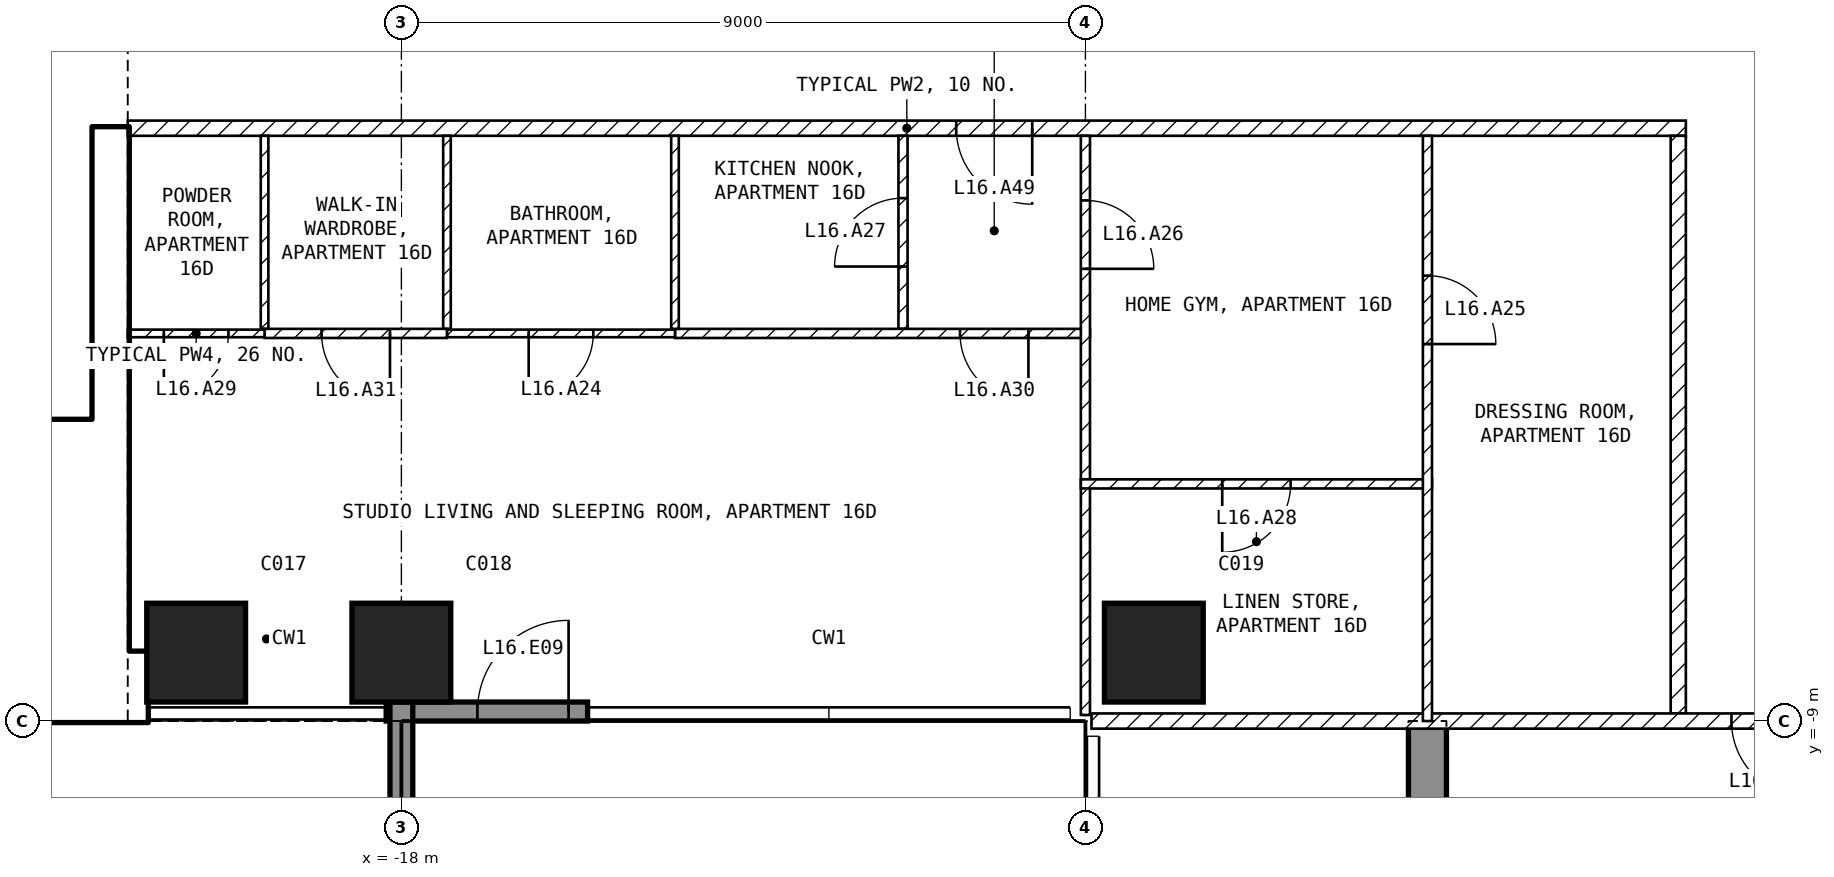
"""IFC4 building model, lengths in metres.
Left out: names, types, materials, properties, quantities, classifications, styles, units other than length and angle.
Written with IfcOpenShell. Run it as: python <this file> out.ifc"""

import sys

from ifc_helpers import new_model, si_unit, direction, frame, frame_2d, origin, origin_2d, place, context, subcontext, project, spatial, polyline, rectangle, outline, extrude, element, fill, save


model = new_model("IFC4")
c1 = context("Model", 3, precision=1e-05, world=origin(), true_north=direction((0.0, 1.0)))
c2 = subcontext(c1, "Body", "Model", "MODEL_VIEW")
j1 = project(units=[si_unit("LENGTHUNIT", "METRE"), si_unit("PLANEANGLEUNIT", "RADIAN")], contexts=[c1])
p1 = place(None, origin())
s1 = spatial("IfcSite", under=j1, at=p1, CompositionType="ELEMENT")
p2 = place(p1, origin())
s2 = spatial("IfcBuilding", under=s1, at=p2, CompositionType="ELEMENT")
p3 = place(p2, frame((0.0, 0.0, 75.0)))
s3 = spatial("IfcBuildingStorey", under=s2, at=p3, CompositionType="ELEMENT", Elevation=75.0)
for number, where, z_axis, x_axis in (
    (1, (-20.7, -8.1, -0.25), (0.0, 0.0, 1.0), (1.0, 0.0, 0.0)),
    (2, (-18.0, -8.1, -0.25), (0.0, 0.0, 1.0), (1.0, 0.0, 0.0)),
    (3, (-8.1, -8.1, -0.25), (0.0, 0.0, 1.0), (1.0, 0.0, 0.0)),
):
    element("IfcColumn", number, at=place(p3, frame(where, z_axis=z_axis, x_axis=x_axis)), inside=s3, PredefinedType="COLUMN", context=c2, shape_type="SweptSolid", body=[
        extrude(rectangle(XDim=1.3, YDim=1.3, at=origin_2d()), origin(), (0.0, 0.0, 1.0), 3.5),
    ])
p4 = place(p3, frame((-4.75, -25.45, -0.25), z_axis=(1.0, 0.0, 0.0), x_axis=(0.0, 1.0, 0.0)))
e4 = element("IfcWall", 4, at=p4, inside=s3, PredefinedType="SHEAR", context=c2, shape_type="SweptSolid", body=[
    extrude(outline(polyline([(0.0, 0.0), (4.15, 0.0), (4.15, 2.65), (6.55, 2.65), (6.55, 0.0), (11.95, 0.0), (11.95, 2.65), (14.35, 2.65), (14.35, 0.0), (16.45, 0.0), (16.45, 3.5), (0.0, 3.5), (0.0, 0.0)])), origin(), (0.0, 0.0, 1.0), 0.5),
])
p5 = place(p3, frame((-18.2, -8.875, 0.0), z_axis=(0.0, 0.0, 1.0), x_axis=(1.0, 0.0, 0.0)))
e5 = element("IfcWall", 5, at=p5, inside=s3, PredefinedType="SOLIDWALL", context=c2, shape_type="SweptSolid", body=[
    extrude(rectangle(XDim=2.65, YDim=0.25, at=frame_2d((1.325, 0.0))), origin(), (0.0, 0.0, 1.0), 3.25),
])
p6 = place(p5, frame((1.2, 0.0, 0.0)))
e6 = element("IfcOpeningElement", 6, at=p6, cuts=e5, PredefinedType="OPENING", context=c2, shape_type="SweptSolid", body=[
    extrude(rectangle(XDim=1.2, YDim=2.4, at=frame_2d((0.6, 1.2))), frame((0.0, 0.135, 0.0), z_axis=(0.0, -1.0, 0.0), x_axis=(1.0, 0.0, 0.0)), (0.0, 0.0, 1.0), 0.27),
])
p7 = place(p3, frame((-18.0, -8.75, 0.0), z_axis=(0.0, 0.0, 1.0), x_axis=(0.0, -1.0, 0.0)))
e7 = element("IfcWall", 7, at=p7, inside=s3, PredefinedType="SOLIDWALL", context=c2, shape_type="SweptSolid", body=[
    extrude(rectangle(XDim=2.95, YDim=0.3, at=frame_2d((1.475, 0.0))), origin(), (0.0, 0.0, 1.0), 3.25),
])
p8 = place(p3, frame((-32.4, -8.55, 0.0), z_axis=(0.0, 0.0, 1.0), x_axis=(1.0, 0.0, 0.0)))
e8 = element("IfcWall", 8, at=p8, inside=s3, PredefinedType="SHEAR", context=c2, shape_type="SweptSolid", body=[
    extrude(rectangle(XDim=11.05, YDim=0.9, at=frame_2d((5.525, 0.0))), origin(), (0.0, 0.0, 1.0), 3.25),
])
p9 = place(p3, frame((-21.825, -8.1, 0.0), z_axis=(0.0, 0.0, 1.0), x_axis=(0.0, 1.0, 0.0)))
e9 = element("IfcWall", 9, at=p9, inside=s3, PredefinedType="SHEAR", context=c2, shape_type="SweptSolid", body=[
    extrude(rectangle(XDim=6.9, YDim=0.45, at=frame_2d((3.45, 0.0))), origin(), (0.0, 0.0, 1.0), 3.25),
])
p10 = place(p3, frame((-28.35, -5.15, 0.0), z_axis=(0.0, 0.0, 1.0), x_axis=(1.0, 0.0, 0.0)))
e10 = element("IfcWall", 10, at=p10, inside=s3, PredefinedType="SOLIDWALL", context=c2, shape_type="SweptSolid", body=[
    extrude(rectangle(XDim=6.3, YDim=0.2, at=frame_2d((3.15, 0.0))), origin(), (0.0, 0.0, 1.0), 3.25),
])
p11 = place(p10, frame((5.1, 0.0, 0.0)))
e11 = element("IfcOpeningElement", 11, at=p11, cuts=e10, PredefinedType="OPENING", context=c2, shape_type="SweptSolid", body=[
    extrude(rectangle(XDim=1.0, YDim=2.1, at=frame_2d((0.5, 1.05))), frame((0.0, 0.11, 0.0), z_axis=(0.0, -1.0, 0.0), x_axis=(1.0, 0.0, 0.0)), (0.0, 0.0, 1.0), 0.22),
])
p12 = place(p3, frame((-1.1, -1.2, 0.0), z_axis=(0.0, 0.0, 1.0), x_axis=(-1.0, 0.0, 0.0)))
e12 = element("IfcWall", 12, at=p12, inside=s3, PredefinedType="PARTITIONING", context=c2, shape_type="SweptSolid", body=[
    extrude(rectangle(XDim=20.5, YDim=0.2, at=frame_2d((10.25, 0.0))), origin(), (0.0, 0.0, 1.0), 3.25),
])
p13 = place(p12, frame((8.6, 0.0, 0.0)))
e13 = element("IfcOpeningElement", 13, at=p13, cuts=e12, PredefinedType="OPENING", context=c2, shape_type="SweptSolid", body=[
    extrude(rectangle(XDim=1.0, YDim=2.1, at=frame_2d((0.5, 1.05))), frame((0.0, 0.11, 0.0), z_axis=(0.0, -1.0, 0.0), x_axis=(1.0, 0.0, 0.0)), (0.0, 0.0, 1.0), 0.22),
])
p14 = place(p3, frame((-1.2, -8.9, 0.0), z_axis=(0.0, 0.0, 1.0), x_axis=(0.0, 1.0, 0.0)))
e14 = element("IfcWall", 14, at=p14, inside=s3, PredefinedType="PARTITIONING", context=c2, shape_type="SweptSolid", body=[
    extrude(rectangle(XDim=7.6, YDim=0.2, at=frame_2d((3.8, 0.0))), origin(), (0.0, 0.0, 1.0), 3.25),
])
p15 = place(p3, frame((8.92, -9.0, 0.0), z_axis=(0.0, 0.0, 1.0), x_axis=(-1.0, 0.0, 0.0)))
e15 = element("IfcWall", 15, at=p15, inside=s3, PredefinedType="PARTITIONING", context=c2, shape_type="SweptSolid", body=[
    extrude(rectangle(XDim=17.84, YDim=0.2, at=frame_2d((8.92, 0.0))), origin(), (0.0, 0.0, 1.0), 3.25),
])
p16 = place(p15, frame((8.42, 0.0, 0.0)))
e16 = element("IfcOpeningElement", 16, at=p16, cuts=e15, PredefinedType="OPENING", context=c2, shape_type="SweptSolid", body=[
    extrude(rectangle(XDim=1.0, YDim=2.1, at=frame_2d((0.5, 1.05))), frame((0.0, 0.11, 0.0), z_axis=(0.0, -1.0, 0.0), x_axis=(1.0, 0.0, 0.0)), (0.0, 0.0, 1.0), 0.22),
])
p17 = place(p3, frame((-11.4, -3.84, 0.0), z_axis=(0.0, 0.0, 1.0), x_axis=(0.0, 1.0, 0.0)))
e17 = element("IfcWall", 17, at=p17, inside=s3, PredefinedType="PARTITIONING", context=c2, shape_type="SweptSolid", body=[
    extrude(rectangle(XDim=2.54, YDim=0.12, at=frame_2d((1.27, 0.0))), origin(), (0.0, 0.0, 1.0), 3.25),
])
p18 = place(p17, frame((0.82, 0.0, 0.0)))
e18 = element("IfcOpeningElement", 18, at=p18, cuts=e17, PredefinedType="OPENING", context=c2, shape_type="SweptSolid", body=[
    extrude(rectangle(XDim=0.9, YDim=2.1, at=frame_2d((0.45, 1.05))), frame((0.0, 0.07, 0.0), z_axis=(0.0, -1.0, 0.0), x_axis=(1.0, 0.0, 0.0)), (0.0, 0.0, 1.0), 0.14),
])
p19 = place(p3, frame((-8.94, -3.9, 0.0), z_axis=(0.0, 0.0, 1.0), x_axis=(-1.0, 0.0, 0.0)))
e19 = element("IfcWall", 19, at=p19, inside=s3, PredefinedType="PARTITIONING", context=c2, shape_type="SweptSolid", body=[
    extrude(rectangle(XDim=5.46, YDim=0.12, at=frame_2d((2.73, 0.0))), origin(), (0.0, 0.0, 1.0), 3.25),
])
p20 = place(p19, frame((0.81, 0.0, 0.0)))
e20 = element("IfcOpeningElement", 20, at=p20, cuts=e19, PredefinedType="OPENING", context=c2, shape_type="SweptSolid", body=[
    extrude(rectangle(XDim=0.9, YDim=2.1, at=frame_2d((0.45, 1.05))), frame((0.0, 0.07, 0.0), z_axis=(0.0, -1.0, 0.0), x_axis=(1.0, 0.0, 0.0)), (0.0, 0.0, 1.0), 0.14),
])
p21 = place(p3, frame((-9.0, -1.3, 0.0), z_axis=(0.0, 0.0, 1.0), x_axis=(0.0, -1.0, 0.0)))
e21 = element("IfcWall", 21, at=p21, inside=s3, PredefinedType="PARTITIONING", context=c2, shape_type="SweptSolid", body=[
    extrude(rectangle(XDim=7.62, YDim=0.12, at=frame_2d((3.81, 0.0))), origin(), (0.0, 0.0, 1.0), 3.25),
])
p22 = place(p21, frame((0.85, 0.0, 0.0)))
e22 = element("IfcOpeningElement", 22, at=p22, cuts=e21, PredefinedType="OPENING", context=c2, shape_type="SweptSolid", body=[
    extrude(rectangle(XDim=0.9, YDim=2.1, at=frame_2d((0.45, 1.05))), frame((0.0, 0.07, 0.0), z_axis=(0.0, -1.0, 0.0), x_axis=(1.0, 0.0, 0.0)), (0.0, 0.0, 1.0), 0.14),
])
for number, where, z_axis, x_axis in (
    (23, (-14.4, -3.84, 0.0), (0.0, 0.0, 1.0), (0.0, 1.0, 0.0)),
    (24, (-17.4, -3.84, 0.0), (0.0, 0.0, 1.0), (0.0, 1.0, 0.0)),
):
    element("IfcWall", number, at=place(p3, frame(where, z_axis=z_axis, x_axis=x_axis)), inside=s3, PredefinedType="PARTITIONING", context=c2, shape_type="SweptSolid", body=[
        extrude(rectangle(XDim=2.54, YDim=0.1, at=frame_2d((1.27, 0.0))), origin(), (0.0, 0.0, 1.0), 3.25),
    ])
p23 = place(p3, frame((-14.4, -3.9, 0.0), z_axis=(0.0, 0.0, 1.0), x_axis=(-1.0, 0.0, 0.0)))
e25 = element("IfcWall", 25, at=p23, inside=s3, PredefinedType="PARTITIONING", context=c2, shape_type="SweptSolid", body=[
    extrude(rectangle(XDim=3.0, YDim=0.1, at=frame_2d((1.5, 0.0))), origin(), (0.0, 0.0, 1.0), 3.25),
])
p24 = place(p23, frame((1.075, 0.0, 0.0)))
e26 = element("IfcOpeningElement", 26, at=p24, cuts=e25, PredefinedType="OPENING", context=c2, shape_type="SweptSolid", body=[
    extrude(rectangle(XDim=0.85, YDim=2.1, at=frame_2d((0.425, 1.05))), frame((0.0, 0.06, 0.0), z_axis=(0.0, -1.0, 0.0), x_axis=(1.0, 0.0, 0.0)), (0.0, 0.0, 1.0), 0.12),
])
p25 = place(p3, frame((-19.8, -3.84, 0.0), z_axis=(0.0, 0.0, 1.0), x_axis=(0.0, 1.0, 0.0)))
e27 = element("IfcWall", 27, at=p25, inside=s3, PredefinedType="PARTITIONING", context=c2, shape_type="SweptSolid", body=[
    extrude(rectangle(XDim=2.54, YDim=0.1, at=frame_2d((1.27, 0.0))), origin(), (0.0, 0.0, 1.0), 3.25),
])
p26 = place(p3, frame((-17.4, -3.9, 0.0), z_axis=(0.0, 0.0, 1.0), x_axis=(-1.0, 0.0, 0.0)))
e28 = element("IfcWall", 28, at=p26, inside=s3, PredefinedType="PARTITIONING", context=c2, shape_type="SweptSolid", body=[
    extrude(rectangle(XDim=2.4, YDim=0.12, at=frame_2d((1.2, 0.0))), origin(), (0.0, 0.0, 1.0), 3.25),
])
p27 = place(p26, frame((0.75, 0.0, 0.0)))
e29 = element("IfcOpeningElement", 29, at=p27, cuts=e28, PredefinedType="OPENING", context=c2, shape_type="SweptSolid", body=[
    extrude(rectangle(XDim=0.9, YDim=2.1, at=frame_2d((0.45, 1.05))), frame((0.0, 0.07, 0.0), z_axis=(0.0, -1.0, 0.0), x_axis=(1.0, 0.0, 0.0)), (0.0, 0.0, 1.0), 0.14),
])
p28 = place(p3, frame((-19.8, -3.9, 0.0), z_axis=(0.0, 0.0, 1.0), x_axis=(-1.0, 0.0, 0.0)))
e30 = element("IfcWall", 30, at=p28, inside=s3, PredefinedType="PARTITIONING", context=c2, shape_type="SweptSolid", body=[
    extrude(rectangle(XDim=1.8, YDim=0.1, at=frame_2d((0.9, 0.0))), origin(), (0.0, 0.0, 1.0), 3.25),
])
p29 = place(p28, frame((0.475, 0.0, 0.0)))
e31 = element("IfcOpeningElement", 31, at=p29, cuts=e30, PredefinedType="OPENING", context=c2, shape_type="SweptSolid", body=[
    extrude(rectangle(XDim=0.85, YDim=2.1, at=frame_2d((0.425, 1.05))), frame((0.0, 0.06, 0.0), z_axis=(0.0, -1.0, 0.0), x_axis=(1.0, 0.0, 0.0)), (0.0, 0.0, 1.0), 0.12),
])
p30 = place(p3, frame((-4.44, -5.88, 0.0), z_axis=(0.0, 0.0, 1.0), x_axis=(-1.0, 0.0, 0.0)))
e32 = element("IfcWall", 32, at=p30, inside=s3, PredefinedType="PARTITIONING", context=c2, shape_type="SweptSolid", body=[
    extrude(rectangle(XDim=4.62, YDim=0.12, at=frame_2d((2.31, 0.0))), origin(), (0.0, 0.0, 1.0), 3.25),
])
p31 = place(p30, frame((1.86, 0.0, 0.0)))
e33 = element("IfcOpeningElement", 33, at=p31, cuts=e32, PredefinedType="OPENING", context=c2, shape_type="SweptSolid", body=[
    extrude(rectangle(XDim=0.9, YDim=2.1, at=frame_2d((0.45, 1.05))), frame((0.0, 0.07, 0.0), z_axis=(0.0, -1.0, 0.0), x_axis=(1.0, 0.0, 0.0)), (0.0, 0.0, 1.0), 0.14),
])
p32 = place(p3, frame((-4.5, -1.3, 0.0), z_axis=(0.0, 0.0, 1.0), x_axis=(0.0, -1.0, 0.0)))
e34 = element("IfcWall", 34, at=p32, inside=s3, PredefinedType="PARTITIONING", context=c2, shape_type="SweptSolid", body=[
    extrude(rectangle(XDim=7.7, YDim=0.12, at=frame_2d((3.85, 0.0))), origin(), (0.0, 0.0, 1.0), 3.25),
])
p33 = place(p32, frame((1.84, 0.0, 0.0)))
e35 = element("IfcOpeningElement", 35, at=p33, cuts=e34, PredefinedType="OPENING", context=c2, shape_type="SweptSolid", body=[
    extrude(rectangle(XDim=0.9, YDim=2.1, at=frame_2d((0.45, 1.05))), frame((0.0, 0.07, 0.0), z_axis=(0.0, -1.0, 0.0), x_axis=(1.0, 0.0, 0.0)), (0.0, 0.0, 1.0), 0.14),
])
p34 = place(p6, origin())
e36 = element("IfcDoor", 36, at=p34, inside=s3, OperationType="SINGLE_SWING_RIGHT", PredefinedType="DOOR", context=c2, shape_type="SweptSolid", body=[
    extrude(rectangle(XDim=1.2, YDim=2.4, at=frame_2d((0.6, 1.2))), frame((0.0, 0.025, 0.0), z_axis=(0.0, -1.0, 0.0), x_axis=(1.0, 0.0, 0.0)), (0.0, 0.0, 1.0), 0.05),
])
fill(e6, e36)
p35 = place(p11, origin())
e37 = element("IfcDoor", 37, at=p35, inside=s3, OperationType="SINGLE_SWING_LEFT", PredefinedType="DOOR", context=c2, shape_type="SweptSolid", body=[
    extrude(rectangle(XDim=1.0, YDim=2.1, at=frame_2d((0.5, 1.05))), frame((0.0, 0.025, 0.0), z_axis=(0.0, -1.0, 0.0), x_axis=(1.0, 0.0, 0.0)), (0.0, 0.0, 1.0), 0.05),
])
fill(e11, e37)
p36 = place(p24, origin())
e38 = element("IfcDoor", 38, at=p36, inside=s3, OperationType="SINGLE_SWING_RIGHT", PredefinedType="DOOR", context=c2, shape_type="SweptSolid", body=[
    extrude(rectangle(XDim=0.85, YDim=2.1, at=frame_2d((0.425, 1.05))), frame((0.0, 0.025, 0.0), z_axis=(0.0, -1.0, 0.0), x_axis=(1.0, 0.0, 0.0)), (0.0, 0.0, 1.0), 0.05),
])
fill(e26, e38)
p37 = place(p33, origin())
e39 = element("IfcDoor", 39, at=p37, inside=s3, OperationType="SINGLE_SWING_RIGHT", PredefinedType="DOOR", context=c2, shape_type="SweptSolid", body=[
    extrude(rectangle(XDim=0.9, YDim=2.1, at=frame_2d((0.45, 1.05))), frame((0.0, 0.025, 0.0), z_axis=(0.0, -1.0, 0.0), x_axis=(1.0, 0.0, 0.0)), (0.0, 0.0, 1.0), 0.05),
])
fill(e35, e39)
p38 = place(p22, origin())
e40 = element("IfcDoor", 40, at=p38, inside=s3, OperationType="SINGLE_SWING_RIGHT", PredefinedType="DOOR", context=c2, shape_type="SweptSolid", body=[
    extrude(rectangle(XDim=0.9, YDim=2.1, at=frame_2d((0.45, 1.05))), frame((0.0, 0.025, 0.0), z_axis=(0.0, -1.0, 0.0), x_axis=(1.0, 0.0, 0.0)), (0.0, 0.0, 1.0), 0.05),
])
fill(e22, e40)
p39 = place(p18, origin())
e41 = element("IfcDoor", 41, at=p39, inside=s3, OperationType="SINGLE_SWING_LEFT", PredefinedType="DOOR", context=c2, shape_type="SweptSolid", body=[
    extrude(rectangle(XDim=0.9, YDim=2.1, at=frame_2d((0.45, 1.05))), frame((0.0, 0.025, 0.0), z_axis=(0.0, -1.0, 0.0), x_axis=(1.0, 0.0, 0.0)), (0.0, 0.0, 1.0), 0.05),
])
fill(e18, e41)
p40 = place(p31, origin())
e42 = element("IfcDoor", 42, at=p40, inside=s3, OperationType="SINGLE_SWING_RIGHT", PredefinedType="DOOR", context=c2, shape_type="SweptSolid", body=[
    extrude(rectangle(XDim=0.9, YDim=2.1, at=frame_2d((0.45, 1.05))), frame((0.0, 0.025, 0.0), z_axis=(0.0, -1.0, 0.0), x_axis=(1.0, 0.0, 0.0)), (0.0, 0.0, 1.0), 0.05),
])
fill(e33, e42)
p41 = place(p29, origin())
e43 = element("IfcDoor", 43, at=p41, inside=s3, OperationType="SINGLE_SWING_RIGHT", PredefinedType="DOOR", context=c2, shape_type="SweptSolid", body=[
    extrude(rectangle(XDim=0.85, YDim=2.1, at=frame_2d((0.425, 1.05))), frame((0.0, 0.025, 0.0), z_axis=(0.0, -1.0, 0.0), x_axis=(1.0, 0.0, 0.0)), (0.0, 0.0, 1.0), 0.05),
])
fill(e31, e43)
p42 = place(p20, origin())
e44 = element("IfcDoor", 44, at=p42, inside=s3, OperationType="SINGLE_SWING_LEFT", PredefinedType="DOOR", context=c2, shape_type="SweptSolid", body=[
    extrude(rectangle(XDim=0.9, YDim=2.1, at=frame_2d((0.45, 1.05))), frame((0.0, 0.025, 0.0), z_axis=(0.0, -1.0, 0.0), x_axis=(1.0, 0.0, 0.0)), (0.0, 0.0, 1.0), 0.05),
])
fill(e20, e44)
p43 = place(p27, origin())
e45 = element("IfcDoor", 45, at=p43, inside=s3, OperationType="SINGLE_SWING_LEFT", PredefinedType="DOOR", context=c2, shape_type="SweptSolid", body=[
    extrude(rectangle(XDim=0.9, YDim=2.1, at=frame_2d((0.45, 1.05))), frame((0.0, 0.025, 0.0), z_axis=(0.0, -1.0, 0.0), x_axis=(1.0, 0.0, 0.0)), (0.0, 0.0, 1.0), 0.05),
])
fill(e29, e45)
p44 = place(p16, origin())
e46 = element("IfcDoor", 46, at=p44, inside=s3, OperationType="SINGLE_SWING_LEFT", PredefinedType="DOOR", context=c2, shape_type="SweptSolid", body=[
    extrude(rectangle(XDim=1.0, YDim=2.1, at=frame_2d((0.5, 1.05))), frame((0.0, 0.025, 0.0), z_axis=(0.0, -1.0, 0.0), x_axis=(1.0, 0.0, 0.0)), (0.0, 0.0, 1.0), 0.05),
])
fill(e16, e46)
p45 = place(p13, origin())
e47 = element("IfcDoor", 47, at=p45, inside=s3, OperationType="SINGLE_SWING_LEFT", PredefinedType="DOOR", context=c2, shape_type="SweptSolid", body=[
    extrude(rectangle(XDim=1.0, YDim=2.1, at=frame_2d((0.5, 1.05))), frame((0.0, 0.025, 0.0), z_axis=(0.0, -1.0, 0.0), x_axis=(1.0, 0.0, 0.0)), (0.0, 0.0, 1.0), 0.05),
])
fill(e13, e47)
save(model, sys.argv[1])
